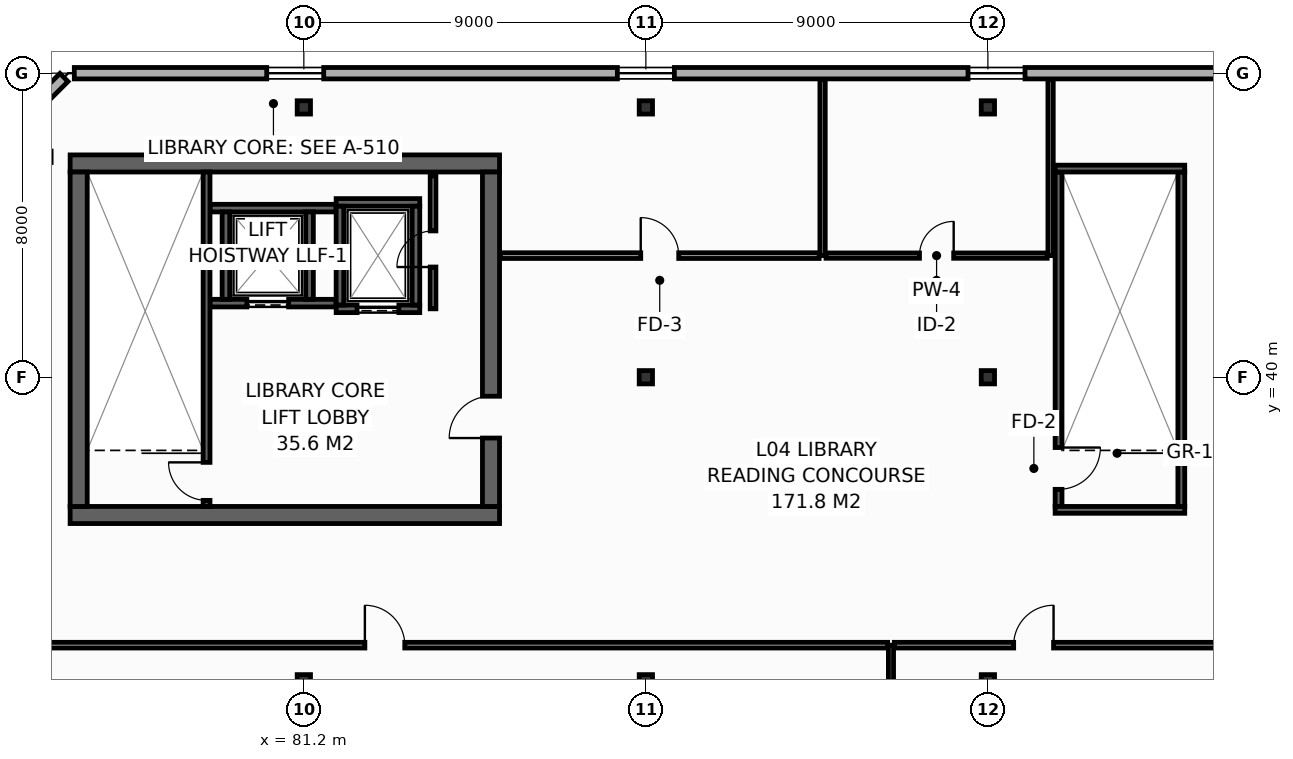
"""IFC4 building model, lengths in metres.
Left out: names, types, materials, properties, quantities, classifications, styles, units other than length and angle.
Written with IfcOpenShell. Run it as: python <this file> out.ifc"""

import sys

from ifc_helpers import new_model, si_unit, direction, frame, frame_2d, origin, origin_2d, place, context, subcontext, project, spatial, rectangle, i_section, extrude, element, fill, save


model = new_model("IFC4")
c1 = context("Model", 3, precision=1e-05, world=origin(), true_north=direction((0.0, 1.0)))
c2 = subcontext(c1, "Body", "Model", "MODEL_VIEW")
j1 = project(units=[si_unit("LENGTHUNIT", "METRE"), si_unit("PLANEANGLEUNIT", "RADIAN")], contexts=[c1])
p1 = place(None, origin())
s1 = spatial("IfcSite", under=j1, at=p1, CompositionType="ELEMENT")
p2 = place(p1, origin())
s2 = spatial("IfcBuilding", under=s1, at=p2, CompositionType="ELEMENT")
p3 = place(p2, frame((0.0, 0.0, 22.2)))
s3 = spatial("IfcBuildingStorey", under=s2, at=p3, CompositionType="ELEMENT", Elevation=22.2)
for number, where, z_axis, x_axis in (
    (1, (75.05, 36.375, 0.0), (0.0, 0.0, 1.0), (1.0, 0.0, 0.0)),
    (2, (75.05, 45.625, 0.0), (0.0, 0.0, 1.0), (1.0, 0.0, 0.0)),
):
    element("IfcWall", number, at=place(p3, frame(where, z_axis=z_axis, x_axis=x_axis)), inside=s3, PredefinedType="SHEAR", context=c2, shape_type="SweptSolid", body=[
        extrude(rectangle(XDim=11.3, YDim=0.45, at=frame_2d((5.65, 0.0))), origin(), (0.0, 0.0, 1.0), 5.1),
    ])
p4 = place(p3, frame((75.275, 36.6, 0.0), z_axis=(0.0, 0.0, 1.0), x_axis=(0.0, 1.0, 0.0)))
e3 = element("IfcWall", 3, at=p4, inside=s3, PredefinedType="SHEAR", context=c2, shape_type="SweptSolid", body=[
    extrude(rectangle(XDim=8.8, YDim=0.45, at=frame_2d((4.4, 0.0))), origin(), (0.0, 0.0, 1.0), 5.1),
])
p5 = place(p3, frame((86.125, 36.6, 0.0), z_axis=(0.0, 0.0, 1.0), x_axis=(0.0, 1.0, 0.0)))
e4 = element("IfcWall", 4, at=p5, inside=s3, PredefinedType="SHEAR", context=c2, shape_type="SweptSolid", body=[
    extrude(rectangle(XDim=8.8, YDim=0.45, at=frame_2d((4.4, 0.0))), origin(), (0.0, 0.0, 1.0), 5.1),
])
p6 = place(p5, frame((1.8, 0.0, 0.0)))
e5 = element("IfcOpeningElement", 5, at=p6, cuts=e4, PredefinedType="OPENING", context=c2, shape_type="SweptSolid", body=[
    extrude(rectangle(XDim=1.1, YDim=2.15, at=frame_2d((0.55, 1.075))), frame((0.0, 0.235, 0.0), z_axis=(0.0, -1.0, 0.0), x_axis=(1.0, 0.0, 0.0)), (0.0, 0.0, 1.0), 0.47),
])
for number, where, z_axis, x_axis in (
    (6, (81.2, 32.0, 0.0), (0.0, 0.0, 1.0), (1.0, 0.0, 0.0)),
    (7, (81.2, 47.1, 0.0), (0.0, 0.0, 1.0), (1.0, 0.0, 0.0)),
    (8, (90.2, 32.0, 0.0), (0.0, 0.0, 1.0), (1.0, 0.0, 0.0)),
    (9, (90.2, 40.0, 0.0), (0.0, 0.0, 1.0), (1.0, 0.0, 0.0)),
    (10, (90.2, 47.1, 0.0), (0.0, 0.0, 1.0), (1.0, 0.0, 0.0)),
    (11, (99.2, 32.0, 0.0), (0.0, 0.0, 1.0), (1.0, 0.0, 0.0)),
    (12, (99.2, 40.0, 0.0), (0.0, 0.0, 1.0), (1.0, 0.0, 0.0)),
    (13, (99.2, 47.1, 0.0), (0.0, 0.0, 1.0), (1.0, 0.0, 0.0)),
):
    element("IfcColumn", number, at=place(p3, frame(where, z_axis=z_axis, x_axis=x_axis)), inside=s3, PredefinedType="COLUMN", context=c2, shape_type="SweptSolid", body=[
        extrude(i_section(OverallWidth=0.35, OverallDepth=0.35, WebThickness=0.012, FlangeThickness=0.019, FilletRadius=0.02, at=origin_2d()), origin(), (0.0, 0.0, 1.0), 5.4),
    ])
p7 = place(p3, frame((78.73, 41.95, 0.0), z_axis=(0.0, 0.0, 1.0), x_axis=(1.0, 0.0, 0.0)))
e14 = element("IfcWall", 14, at=p7, inside=s3, PredefinedType="SHEAR", context=c2, shape_type="SweptSolid", body=[
    extrude(rectangle(XDim=3.32, YDim=0.2, at=frame_2d((1.66, 0.0))), origin(), (0.0, 0.0, 1.0), 4.88),
])
p8 = place(p7, frame((0.97, 0.0, 0.0)))
e15 = element("IfcOpeningElement", 15, at=p8, cuts=e14, PredefinedType="OPENING", context=c2, shape_type="SweptSolid", body=[
    extrude(rectangle(XDim=1.1, YDim=2.2, at=frame_2d((0.55, 1.1))), frame((0.0, 0.11, 0.0), z_axis=(0.0, -1.0, 0.0), x_axis=(1.0, 0.0, 0.0)), (0.0, 0.0, 1.0), 0.22),
])
p9 = place(p3, frame((78.73, 44.45, 0.0), z_axis=(0.0, 0.0, 1.0), x_axis=(1.0, 0.0, 0.0)))
e16 = element("IfcWall", 16, at=p9, inside=s3, PredefinedType="SHEAR", context=c2, shape_type="SweptSolid", body=[
    extrude(rectangle(XDim=3.32, YDim=0.2, at=frame_2d((1.66, 0.0))), origin(), (0.0, 0.0, 1.0), 4.88),
])
for number, where, z_axis, x_axis in (
    (17, (79.15, 42.05, 0.0), (0.0, 0.0, 1.0), (0.0, 1.0, 0.0)),
    (18, (81.35, 42.05, 0.0), (0.0, 0.0, 1.0), (0.0, 1.0, 0.0)),
):
    element("IfcWall", number, at=place(p3, frame(where, z_axis=z_axis, x_axis=x_axis)), inside=s3, PredefinedType="SHEAR", context=c2, shape_type="SweptSolid", body=[
        extrude(rectangle(XDim=2.3, YDim=0.2, at=frame_2d((1.15, 0.0))), origin(), (0.0, 0.0, 1.0), 4.88),
    ])
p10 = place(p3, frame((82.05, 41.8, 0.0), z_axis=(0.0, 0.0, 1.0), x_axis=(1.0, 0.0, 0.0)))
e19 = element("IfcWall", 19, at=p10, inside=s3, PredefinedType="SHEAR", context=c2, shape_type="SweptSolid", body=[
    extrude(rectangle(XDim=2.2, YDim=0.2, at=frame_2d((1.1, 0.0))), origin(), (0.0, 0.0, 1.0), 4.88),
])
p11 = place(p10, frame((0.55, 0.0, 0.0)))
e20 = element("IfcOpeningElement", 20, at=p11, cuts=e19, PredefinedType="OPENING", context=c2, shape_type="SweptSolid", body=[
    extrude(rectangle(XDim=1.1, YDim=2.2, at=frame_2d((0.55, 1.1))), frame((0.0, 0.11, 0.0), z_axis=(0.0, -1.0, 0.0), x_axis=(1.0, 0.0, 0.0)), (0.0, 0.0, 1.0), 0.22),
])
p12 = place(p3, frame((82.05, 44.6, 0.0), z_axis=(0.0, 0.0, 1.0), x_axis=(1.0, 0.0, 0.0)))
e21 = element("IfcWall", 21, at=p12, inside=s3, PredefinedType="SHEAR", context=c2, shape_type="SweptSolid", body=[
    extrude(rectangle(XDim=2.2, YDim=0.2, at=frame_2d((1.1, 0.0))), origin(), (0.0, 0.0, 1.0), 4.88),
])
for number, where, z_axis, x_axis in (
    (22, (82.15, 41.9, 0.0), (0.0, 0.0, 1.0), (0.0, 1.0, 0.0)),
    (23, (84.15, 41.9, 0.0), (0.0, 0.0, 1.0), (0.0, 1.0, 0.0)),
):
    element("IfcWall", number, at=place(p3, frame(where, z_axis=z_axis, x_axis=x_axis)), inside=s3, PredefinedType="SHEAR", context=c2, shape_type="SweptSolid", body=[
        extrude(rectangle(XDim=2.6, YDim=0.2, at=frame_2d((1.3, 0.0))), origin(), (0.0, 0.0, 1.0), 4.88),
    ])
p13 = place(p3, frame((78.64, 36.6, 0.0), z_axis=(0.0, 0.0, 1.0), x_axis=(0.0, 1.0, 0.0)))
e24 = element("IfcWall", 24, at=p13, inside=s3, PredefinedType="SHEAR", context=c2, shape_type="SweptSolid", body=[
    extrude(rectangle(XDim=8.8, YDim=0.18, at=frame_2d((4.4, 0.0))), origin(), (0.0, 0.0, 1.0), 5.15),
])
p14 = place(p13, frame((0.16, 0.0, 0.0)))
e25 = element("IfcOpeningElement", 25, at=p14, cuts=e24, PredefinedType="OPENING", context=c2, shape_type="SweptSolid", body=[
    extrude(rectangle(XDim=1.0, YDim=2.15, at=frame_2d((0.5, 1.075))), frame((0.0, 0.1, 0.0), z_axis=(0.0, -1.0, 0.0), x_axis=(1.0, 0.0, 0.0)), (0.0, 0.0, 1.0), 0.2),
])
p15 = place(p3, frame((101.06, 45.4, 0.0), z_axis=(0.0, 0.0, 1.0), x_axis=(0.0, -1.0, 0.0)))
e26 = element("IfcWall", 26, at=p15, inside=s3, PredefinedType="SHEAR", context=c2, shape_type="SweptSolid", body=[
    extrude(rectangle(XDim=8.8, YDim=0.18, at=frame_2d((4.4, 0.0))), origin(), (0.0, 0.0, 1.0), 5.15),
])
p16 = place(p15, frame((7.25, 0.0, 0.0)))
e27 = element("IfcOpeningElement", 27, at=p16, cuts=e26, PredefinedType="OPENING", context=c2, shape_type="SweptSolid", body=[
    extrude(rectangle(XDim=1.1, YDim=2.15, at=frame_2d((0.55, 1.075))), frame((0.0, 0.1, 0.0), z_axis=(0.0, -1.0, 0.0), x_axis=(1.0, 0.0, 0.0)), (0.0, 0.0, 1.0), 0.2),
])
p17 = place(p3, frame((100.97, 36.51, 0.0), z_axis=(0.0, 0.0, 1.0), x_axis=(1.0, 0.0, 0.0)))
e28 = element("IfcWall", 28, at=p17, inside=s3, PredefinedType="SHEAR", context=c2, shape_type="SweptSolid", body=[
    extrude(rectangle(XDim=3.41, YDim=0.18, at=frame_2d((1.705, 0.0))), origin(), (0.0, 0.0, 1.0), 5.15),
])
p18 = place(p3, frame((104.29, 36.6, 0.0), z_axis=(0.0, 0.0, 1.0), x_axis=(0.0, 1.0, 0.0)))
e29 = element("IfcWall", 29, at=p18, inside=s3, PredefinedType="SHEAR", context=c2, shape_type="SweptSolid", body=[
    extrude(rectangle(XDim=8.8, YDim=0.18, at=frame_2d((4.4, 0.0))), origin(), (0.0, 0.0, 1.0), 5.15),
])
p19 = place(p3, frame((104.38, 45.49, 0.0), z_axis=(0.0, 0.0, 1.0), x_axis=(-1.0, 0.0, 0.0)))
e30 = element("IfcWall", 30, at=p19, inside=s3, PredefinedType="SHEAR", context=c2, shape_type="SweptSolid", body=[
    extrude(rectangle(XDim=3.41, YDim=0.18, at=frame_2d((1.705, 0.0))), origin(), (0.0, 0.0, 1.0), 5.15),
])
p20 = place(p3, frame((84.6, 41.8, 0.0), z_axis=(0.0, 0.0, 1.0), x_axis=(0.0, 1.0, 0.0)))
e31 = element("IfcWall", 31, at=p20, inside=s3, PredefinedType="PARTITIONING", context=c2, shape_type="SweptSolid", body=[
    extrude(rectangle(XDim=3.5, YDim=0.15, at=frame_2d((1.75, 0.0))), origin(), (0.0, 0.0, 1.0), 5.15),
])
p21 = place(p20, frame((1.1, 0.0, 0.0)))
e32 = element("IfcOpeningElement", 32, at=p21, cuts=e31, PredefinedType="OPENING", context=c2, shape_type="SweptSolid", body=[
    extrude(rectangle(XDim=0.95, YDim=2.15, at=frame_2d((0.475, 1.075))), frame((0.0, 0.085, 0.0), z_axis=(0.0, -1.0, 0.0), x_axis=(1.0, 0.0, 0.0)), (0.0, 0.0, 1.0), 0.17),
])
p22 = place(p3, frame((105.24, 48.0, 0.0), z_axis=(0.0, 0.0, 1.0), x_axis=(-1.0, 0.0, 0.0)))
e33 = element("IfcWall", 33, at=p22, inside=s3, PredefinedType="STANDARD", context=c2, shape_type="SweptSolid", body=[
    extrude(rectangle(XDim=30.08, YDim=0.3, at=frame_2d((15.04, 0.0))), origin(), (0.0, 0.0, 1.0), 5.15),
])
p23 = place(p22, frame((5.063, 0.0, 0.9)))
e34 = element("IfcOpeningElement", 34, at=p23, cuts=e33, PredefinedType="OPENING", context=c2, shape_type="SweptSolid", body=[
    extrude(rectangle(XDim=1.5, YDim=2.1, at=frame_2d((0.75, 1.05))), frame((0.0, 0.16, 0.0), z_axis=(0.0, -1.0, 0.0), x_axis=(1.0, 0.0, 0.0)), (0.0, 0.0, 1.0), 0.32),
])
p24 = place(p22, frame((14.29, 0.0, 0.9)))
e35 = element("IfcOpeningElement", 35, at=p24, cuts=e33, PredefinedType="OPENING", context=c2, shape_type="SweptSolid", body=[
    extrude(rectangle(XDim=1.5, YDim=2.1, at=frame_2d((0.75, 1.05))), frame((0.0, 0.16, 0.0), z_axis=(0.0, -1.0, 0.0), x_axis=(1.0, 0.0, 0.0)), (0.0, 0.0, 1.0), 0.32),
])
p25 = place(p22, frame((23.517, 0.0, 0.9)))
e36 = element("IfcOpeningElement", 36, at=p25, cuts=e33, PredefinedType="OPENING", context=c2, shape_type="SweptSolid", body=[
    extrude(rectangle(XDim=1.5, YDim=2.1, at=frame_2d((0.75, 1.05))), frame((0.0, 0.16, 0.0), z_axis=(0.0, -1.0, 0.0), x_axis=(1.0, 0.0, 0.0)), (0.0, 0.0, 1.0), 0.32),
])
p26 = place(p3, frame((74.887, 47.887, 0.0), z_axis=(0.0, 0.0, 1.0), x_axis=(-0.707106781187, -0.707106781187, 0.0)))
e37 = element("IfcWall", 37, at=p26, inside=s3, PredefinedType="STANDARD", context=c2, shape_type="SweptSolid", body=[
    extrude(rectangle(XDim=3.64, YDim=0.3, at=frame_2d((1.82, 0.0))), origin(), (0.0, 0.0, 1.0), 5.15),
])
p27 = place(p3, frame((96.65, 28.18, 0.0), z_axis=(0.0, 0.0, 1.0), x_axis=(0.0, 1.0, 0.0)))
e38 = element("IfcWall", 38, at=p27, inside=s3, PredefinedType="PARTITIONING", context=c2, shape_type="SweptSolid", body=[
    extrude(rectangle(XDim=4.77, YDim=0.135, at=frame_2d((2.385, 0.0))), origin(), (0.0, 0.0, 1.0), 3.285),
])
p28 = place(p3, frame((72.3, 32.95, 0.0), z_axis=(0.0, 0.0, 1.0), x_axis=(1.0, 0.0, 0.0)))
e39 = element("IfcWall", 39, at=p28, inside=s3, PredefinedType="PARTITIONING", context=c2, shape_type="SweptSolid", body=[
    extrude(rectangle(XDim=24.262, YDim=0.15, at=frame_2d((12.131, 0.0))), origin(), (0.0, 0.0, 1.0), 3.285),
])
p29 = place(p28, frame((10.506, 0.0, 0.0)))
e40 = element("IfcOpeningElement", 40, at=p29, cuts=e39, PredefinedType="OPENING", context=c2, shape_type="SweptSolid", body=[
    extrude(rectangle(XDim=1.05, YDim=2.15, at=frame_2d((0.525, 1.075))), frame((0.0, 0.085, 0.0), z_axis=(0.0, -1.0, 0.0), x_axis=(1.0, 0.0, 0.0)), (0.0, 0.0, 1.0), 0.17),
])
p30 = place(p3, frame((96.738, 32.95, 0.0), z_axis=(0.0, 0.0, 1.0), x_axis=(1.0, 0.0, 0.0)))
e41 = element("IfcWall", 41, at=p30, inside=s3, PredefinedType="PARTITIONING", context=c2, shape_type="SweptSolid", body=[
    extrude(rectangle(XDim=11.292, YDim=0.15, at=frame_2d((5.646, 0.0))), origin(), (0.0, 0.0, 1.0), 3.285),
])
p31 = place(p30, frame((3.141, 0.0, 0.0)))
e42 = element("IfcOpeningElement", 42, at=p31, cuts=e41, PredefinedType="OPENING", context=c2, shape_type="SweptSolid", body=[
    extrude(rectangle(XDim=1.05, YDim=2.15, at=frame_2d((0.525, 1.075))), frame((0.0, 0.085, 0.0), z_axis=(0.0, -1.0, 0.0), x_axis=(1.0, 0.0, 0.0)), (0.0, 0.0, 1.0), 0.17),
])
p32 = place(p3, frame((94.85, 43.2, 0.0), z_axis=(0.0, 0.0, 1.0), x_axis=(0.0, 1.0, 0.0)))
e43 = element("IfcWall", 43, at=p32, inside=s3, PredefinedType="PARTITIONING", context=c2, shape_type="SweptSolid", body=[
    extrude(rectangle(XDim=4.63, YDim=0.14, at=frame_2d((2.315, 0.0))), origin(), (0.0, 0.0, 1.0), 3.285),
])
p33 = place(p3, frame((100.85, 43.2, 0.0), z_axis=(0.0, 0.0, 1.0), x_axis=(0.0, 1.0, 0.0)))
e44 = element("IfcWall", 44, at=p33, inside=s3, PredefinedType="PARTITIONING", context=c2, shape_type="SweptSolid", body=[
    extrude(rectangle(XDim=4.63, YDim=0.14, at=frame_2d((2.315, 0.0))), origin(), (0.0, 0.0, 1.0), 5.15),
])
p34 = place(p3, frame((86.37, 43.2, 0.0), z_axis=(0.0, 0.0, 1.0), x_axis=(1.0, 0.0, 0.0)))
e45 = element("IfcWall", 45, at=p34, inside=s3, PredefinedType="PARTITIONING", context=c2, shape_type="SweptSolid", body=[
    extrude(rectangle(XDim=8.39, YDim=0.15, at=frame_2d((4.195, 0.0))), origin(), (0.0, 0.0, 1.0), 5.15),
])
p35 = place(p34, frame((3.695, 0.0, 0.0)))
e46 = element("IfcOpeningElement", 46, at=p35, cuts=e45, PredefinedType="OPENING", context=c2, shape_type="SweptSolid", body=[
    extrude(rectangle(XDim=1.0, YDim=2.15, at=frame_2d((0.5, 1.075))), frame((0.0, 0.085, 0.0), z_axis=(0.0, -1.0, 0.0), x_axis=(1.0, 0.0, 0.0)), (0.0, 0.0, 1.0), 0.17),
])
p36 = place(p3, frame((94.94, 43.2, 0.0), z_axis=(0.0, 0.0, 1.0), x_axis=(1.0, 0.0, 0.0)))
e47 = element("IfcWall", 47, at=p36, inside=s3, PredefinedType="PARTITIONING", context=c2, shape_type="SweptSolid", body=[
    extrude(rectangle(XDim=5.82, YDim=0.14, at=frame_2d((2.91, 0.0))), origin(), (0.0, 0.0, 1.0), 3.285),
])
p37 = place(p36, frame((2.46, 0.0, 0.0)))
e48 = element("IfcOpeningElement", 48, at=p37, cuts=e47, PredefinedType="OPENING", context=c2, shape_type="SweptSolid", body=[
    extrude(rectangle(XDim=0.9, YDim=2.1, at=frame_2d((0.45, 1.05))), frame((0.0, 0.08, 0.0), z_axis=(0.0, -1.0, 0.0), x_axis=(1.0, 0.0, 0.0)), (0.0, 0.0, 1.0), 0.16),
])
p38 = place(p8, origin())
e49 = element("IfcDoor", 49, at=p38, inside=s3, OperationType="SLIDING_TO_LEFT", PredefinedType="DOOR", context=c2, shape_type="SweptSolid", body=[
    extrude(rectangle(XDim=1.1, YDim=2.2, at=frame_2d((0.55, 1.1))), frame((0.0, 0.025, 0.0), z_axis=(0.0, -1.0, 0.0), x_axis=(1.0, 0.0, 0.0)), (0.0, 0.0, 1.0), 0.05),
])
fill(e15, e49)
p39 = place(p11, origin())
e50 = element("IfcDoor", 50, at=p39, inside=s3, OperationType="SLIDING_TO_LEFT", PredefinedType="DOOR", context=c2, shape_type="SweptSolid", body=[
    extrude(rectangle(XDim=1.1, YDim=2.2, at=frame_2d((0.55, 1.1))), frame((0.0, 0.025, 0.0), z_axis=(0.0, -1.0, 0.0), x_axis=(1.0, 0.0, 0.0)), (0.0, 0.0, 1.0), 0.05),
])
fill(e20, e50)
p40 = place(p14, origin())
e51 = element("IfcDoor", 51, at=p40, inside=s3, OperationType="SINGLE_SWING_RIGHT", PredefinedType="DOOR", context=c2, shape_type="SweptSolid", body=[
    extrude(rectangle(XDim=1.0, YDim=2.15, at=frame_2d((0.5, 1.075))), frame((0.0, 0.025, 0.0), z_axis=(0.0, -1.0, 0.0), x_axis=(1.0, 0.0, 0.0)), (0.0, 0.0, 1.0), 0.05),
])
fill(e25, e51)
p41 = place(p16, origin())
e52 = element("IfcDoor", 52, at=p41, inside=s3, OperationType="SINGLE_SWING_LEFT", PredefinedType="DOOR", context=c2, shape_type="SweptSolid", body=[
    extrude(rectangle(XDim=1.1, YDim=2.15, at=frame_2d((0.55, 1.075))), frame((0.0, 0.025, 0.0), z_axis=(0.0, -1.0, 0.0), x_axis=(1.0, 0.0, 0.0)), (0.0, 0.0, 1.0), 0.05),
])
fill(e27, e52)
p42 = place(p6, origin())
e53 = element("IfcDoor", 53, at=p42, inside=s3, OperationType="SINGLE_SWING_LEFT", PredefinedType="DOOR", context=c2, shape_type="SweptSolid", body=[
    extrude(rectangle(XDim=1.1, YDim=2.15, at=frame_2d((0.55, 1.075))), frame((0.0, 0.025, 0.0), z_axis=(0.0, -1.0, 0.0), x_axis=(1.0, 0.0, 0.0)), (0.0, 0.0, 1.0), 0.05),
])
fill(e5, e53)
p43 = place(p21, origin())
e54 = element("IfcDoor", 54, at=p43, inside=s3, OperationType="SINGLE_SWING_LEFT", PredefinedType="DOOR", context=c2, shape_type="SweptSolid", body=[
    extrude(rectangle(XDim=0.95, YDim=2.15, at=frame_2d((0.475, 1.075))), frame((0.0, 0.025, 0.0), z_axis=(0.0, -1.0, 0.0), x_axis=(1.0, 0.0, 0.0)), (0.0, 0.0, 1.0), 0.05),
])
fill(e32, e54)
p44 = place(p23, origin())
e55 = element("IfcWindow", 55, at=p44, inside=s3, PartitioningType="SINGLE_PANEL", PredefinedType="WINDOW", context=c2, shape_type="SweptSolid", body=[
    extrude(rectangle(XDim=1.5, YDim=2.1, at=frame_2d((0.75, 1.05))), frame((0.0, 0.03, 0.0), z_axis=(0.0, -1.0, 0.0), x_axis=(1.0, 0.0, 0.0)), (0.0, 0.0, 1.0), 0.06),
])
fill(e34, e55)
p45 = place(p24, origin())
e56 = element("IfcWindow", 56, at=p45, inside=s3, PartitioningType="SINGLE_PANEL", PredefinedType="WINDOW", context=c2, shape_type="SweptSolid", body=[
    extrude(rectangle(XDim=1.5, YDim=2.1, at=frame_2d((0.75, 1.05))), frame((0.0, 0.03, 0.0), z_axis=(0.0, -1.0, 0.0), x_axis=(1.0, 0.0, 0.0)), (0.0, 0.0, 1.0), 0.06),
])
fill(e35, e56)
p46 = place(p25, origin())
e57 = element("IfcWindow", 57, at=p46, inside=s3, PartitioningType="SINGLE_PANEL", PredefinedType="WINDOW", context=c2, shape_type="SweptSolid", body=[
    extrude(rectangle(XDim=1.5, YDim=2.1, at=frame_2d((0.75, 1.05))), frame((0.0, 0.03, 0.0), z_axis=(0.0, -1.0, 0.0), x_axis=(1.0, 0.0, 0.0)), (0.0, 0.0, 1.0), 0.06),
])
fill(e36, e57)
p47 = place(p29, origin())
e58 = element("IfcDoor", 58, at=p47, inside=s3, OperationType="SINGLE_SWING_LEFT", PredefinedType="DOOR", context=c2, shape_type="SweptSolid", body=[
    extrude(rectangle(XDim=1.05, YDim=2.15, at=frame_2d((0.525, 1.075))), frame((0.0, 0.025, 0.0), z_axis=(0.0, -1.0, 0.0), x_axis=(1.0, 0.0, 0.0)), (0.0, 0.0, 1.0), 0.05),
])
fill(e40, e58)
p48 = place(p31, origin())
e59 = element("IfcDoor", 59, at=p48, inside=s3, OperationType="SINGLE_SWING_RIGHT", PredefinedType="DOOR", context=c2, shape_type="SweptSolid", body=[
    extrude(rectangle(XDim=1.05, YDim=2.15, at=frame_2d((0.525, 1.075))), frame((0.0, 0.025, 0.0), z_axis=(0.0, -1.0, 0.0), x_axis=(1.0, 0.0, 0.0)), (0.0, 0.0, 1.0), 0.05),
])
fill(e42, e59)
p49 = place(p35, origin())
e60 = element("IfcDoor", 60, at=p49, inside=s3, OperationType="SINGLE_SWING_LEFT", PredefinedType="DOOR", context=c2, shape_type="SweptSolid", body=[
    extrude(rectangle(XDim=1.0, YDim=2.15, at=frame_2d((0.5, 1.075))), frame((0.0, 0.025, 0.0), z_axis=(0.0, -1.0, 0.0), x_axis=(1.0, 0.0, 0.0)), (0.0, 0.0, 1.0), 0.05),
])
fill(e46, e60)
p50 = place(p37, origin())
e61 = element("IfcDoor", 61, at=p50, inside=s3, OperationType="SINGLE_SWING_RIGHT", PredefinedType="DOOR", context=c2, shape_type="SweptSolid", body=[
    extrude(rectangle(XDim=0.9, YDim=2.1, at=frame_2d((0.45, 1.05))), frame((0.0, 0.025, 0.0), z_axis=(0.0, -1.0, 0.0), x_axis=(1.0, 0.0, 0.0)), (0.0, 0.0, 1.0), 0.05),
])
fill(e48, e61)
save(model, sys.argv[1])
